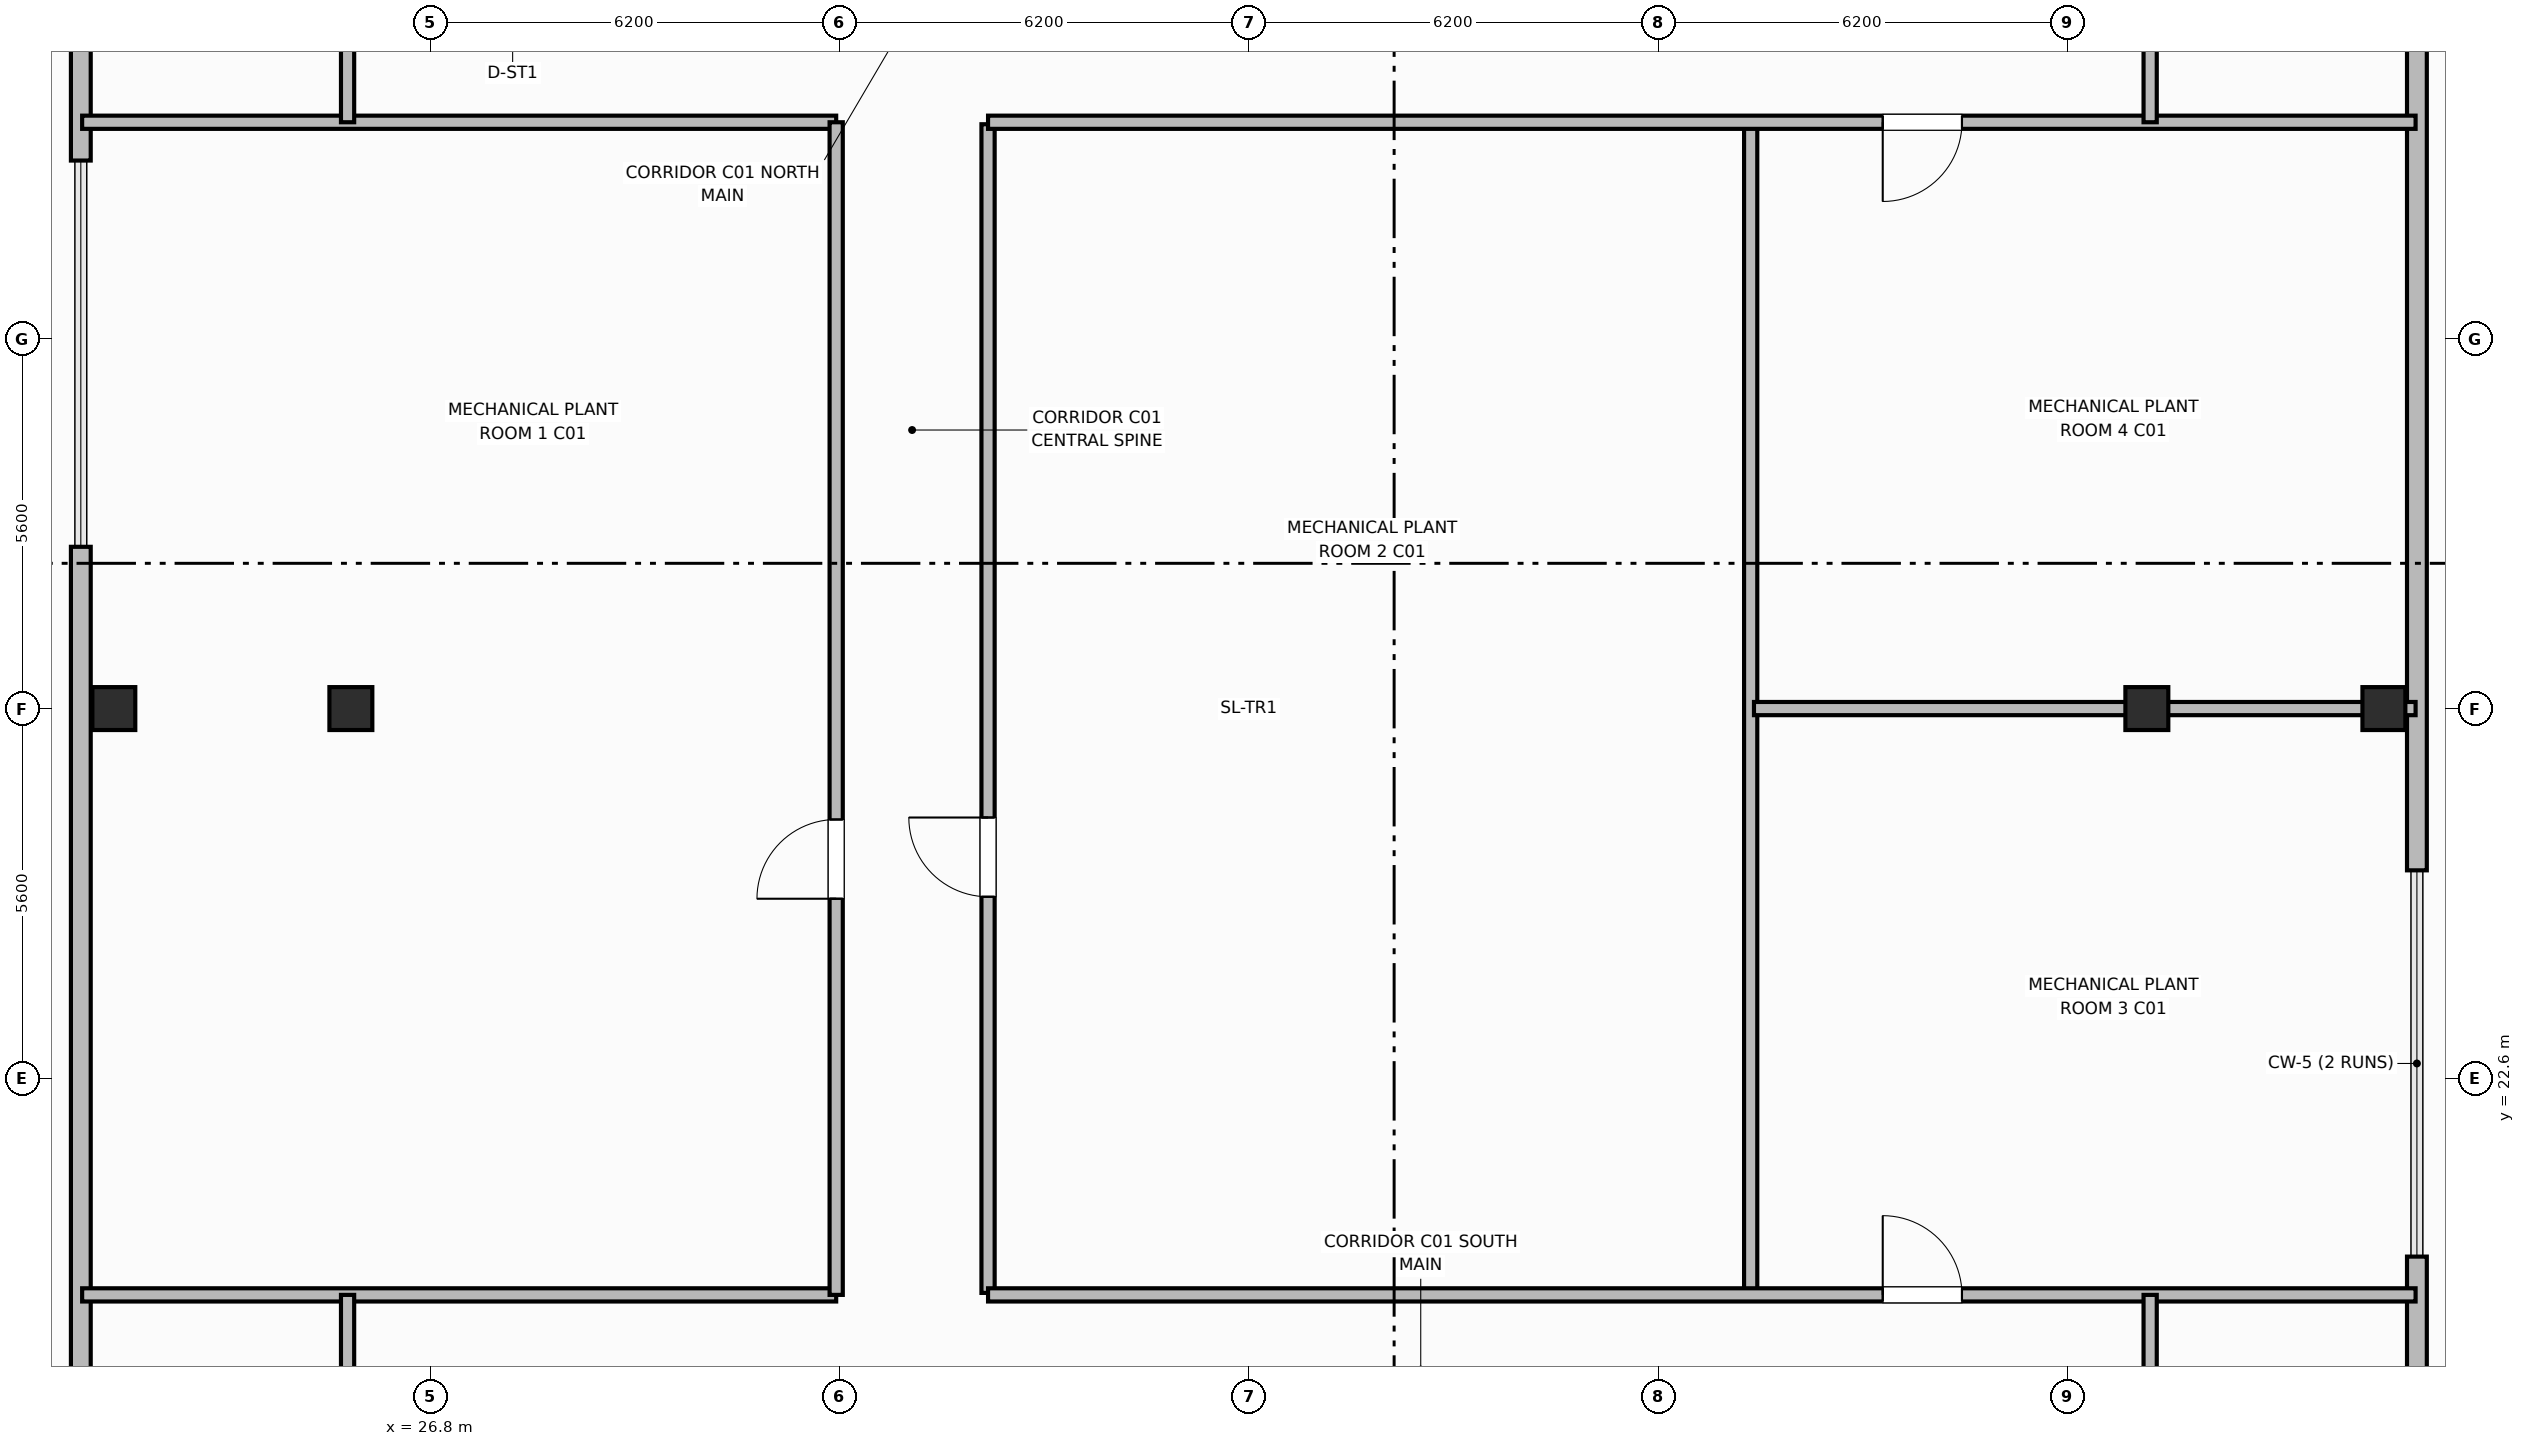
"""IFC4 building model, lengths in metres.
Left out: names, types, materials, properties, quantities, classifications, styles, units other than length and angle.
Written with IfcOpenShell. Run it as: python <this file> out.ifc"""

import sys

from ifc_helpers import new_model, si_unit, direction, frame, frame_2d, origin, origin_2d, place, context, subcontext, project, spatial, rectangle, extrude, element, fill, save


model = new_model("IFC4")
c1 = context("Model", 3, precision=1e-05, world=origin(), true_north=direction((0.0, 1.0)))
c2 = subcontext(c1, "Body", "Model", "MODEL_VIEW")
j1 = project(units=[si_unit("LENGTHUNIT", "METRE"), si_unit("PLANEANGLEUNIT", "RADIAN")], contexts=[c1])
p1 = place(None, origin())
s1 = spatial("IfcSite", under=j1, at=p1, CompositionType="ELEMENT")
p2 = place(p1, origin())
s2 = spatial("IfcBuilding", under=s1, at=p2, CompositionType="ELEMENT")
p3 = place(p2, frame((0.0, 0.0, 302.0)))
s3 = spatial("IfcBuildingStorey", under=s2, at=p3, CompositionType="ELEMENT", Elevation=302.0)
for number, where, z_axis, x_axis in (
    (1, (25.6, 28.2, 0.0), (0.0, 0.0, 1.0), (1.0, 0.0, 0.0)),
    (2, (52.8, 28.2, 0.0), (0.0, 0.0, 1.0), (1.0, 0.0, 0.0)),
    (3, (22.01, 28.2, 0.0), (0.0, 0.0, 1.0), (1.0, 0.0, 0.0)),
    (4, (56.39, 28.2, 0.0), (0.0, 0.0, 1.0), (1.0, 0.0, 0.0)),
):
    element("IfcColumn", number, at=place(p3, frame(where, z_axis=z_axis, x_axis=x_axis)), inside=s3, PredefinedType="COLUMN", context=c2, shape_type="SweptSolid", body=[
        extrude(rectangle(XDim=0.65, YDim=0.65, at=origin_2d()), origin(), (0.0, 0.0, 1.0), 3.6),
    ])
p4 = place(p3, frame((56.89, 12.25, 0.0), z_axis=(0.0, 0.0, 1.0), x_axis=(0.0, 1.0, 0.0)))
e5 = element("IfcWall", 5, at=p4, inside=s3, PredefinedType="SOLIDWALL", context=c2, shape_type="SweptSolid", body=[
    extrude(rectangle(XDim=7.65, YDim=0.3, at=frame_2d((3.825, 0.0))), origin(), (0.0, 0.0, 1.0), 2.84),
])
p5 = place(p3, frame((56.89, 25.75, 0.0), z_axis=(0.0, 0.0, 1.0), x_axis=(0.0, 1.0, 0.0)))
e6 = element("IfcWall", 6, at=p5, inside=s3, PredefinedType="SOLIDWALL", context=c2, shape_type="SweptSolid", body=[
    extrude(rectangle(XDim=18.4, YDim=0.3, at=frame_2d((9.2, 0.0))), origin(), (0.0, 0.0, 1.0), 2.84),
])
p6 = place(p3, frame((21.51, 44.15, 0.0), z_axis=(0.0, 0.0, 1.0), x_axis=(0.0, -1.0, 0.0)))
e7 = element("IfcWall", 7, at=p6, inside=s3, PredefinedType="SOLIDWALL", context=c2, shape_type="SweptSolid", body=[
    extrude(rectangle(XDim=7.65, YDim=0.3, at=frame_2d((3.825, 0.0))), origin(), (0.0, 0.0, 1.0), 2.84),
])
p7 = place(p3, frame((21.51, 30.65, 0.0), z_axis=(0.0, 0.0, 1.0), x_axis=(0.0, -1.0, 0.0)))
e8 = element("IfcWall", 8, at=p7, inside=s3, PredefinedType="SOLIDWALL", context=c2, shape_type="SweptSolid", body=[
    extrude(rectangle(XDim=18.4, YDim=0.3, at=frame_2d((9.2, 0.0))), origin(), (0.0, 0.0, 1.0), 2.84),
])
for number, where, z_axis, x_axis in (
    (9, (21.53, 19.32, 0.0), (0.0, 0.0, 1.0), (1.0, 0.0, 0.0)),
    (10, (21.53, 37.08, 0.0), (0.0, 0.0, 1.0), (1.0, 0.0, 0.0)),
):
    element("IfcWall", number, at=place(p3, frame(where, z_axis=z_axis, x_axis=x_axis)), inside=s3, PredefinedType="PARTITIONING", context=c2, shape_type="SweptSolid", body=[
        extrude(rectangle(XDim=11.42, YDim=0.2, at=frame_2d((5.71, 0.0))), origin(), (0.0, 0.0, 1.0), 2.54),
    ])
p8 = place(p3, frame((32.95, 19.32, 0.0), z_axis=(0.0, 0.0, 1.0), x_axis=(0.0, 1.0, 0.0)))
e11 = element("IfcWall", 11, at=p8, inside=s3, PredefinedType="PARTITIONING", context=c2, shape_type="SweptSolid", body=[
    extrude(rectangle(XDim=17.76, YDim=0.2, at=frame_2d((8.88, 0.0))), origin(), (0.0, 0.0, 1.0), 2.54),
])
p9 = place(p8, frame((6.0, 0.0, 0.0)))
e12 = element("IfcOpeningElement", 12, at=p9, cuts=e11, PredefinedType="OPENING", context=c2, shape_type="SweptSolid", body=[
    extrude(rectangle(XDim=1.2, YDim=2.15, at=frame_2d((0.6, 1.075))), frame((0.0, 0.11, 0.0), z_axis=(0.0, -1.0, 0.0), x_axis=(1.0, 0.0, 0.0)), (0.0, 0.0, 1.0), 0.22),
])
p10 = place(p3, frame((35.25, 19.35, 0.0), z_axis=(0.0, 0.0, 1.0), x_axis=(0.0, 1.0, 0.0)))
e13 = element("IfcWall", 13, at=p10, inside=s3, PredefinedType="PARTITIONING", context=c2, shape_type="SweptSolid", body=[
    extrude(rectangle(XDim=17.7, YDim=0.2, at=frame_2d((8.85, 0.0))), origin(), (0.0, 0.0, 1.0), 2.54),
])
p11 = place(p10, frame((6.0, 0.0, 0.0)))
e14 = element("IfcOpeningElement", 14, at=p11, cuts=e13, PredefinedType="OPENING", context=c2, shape_type="SweptSolid", body=[
    extrude(rectangle(XDim=1.2, YDim=2.15, at=frame_2d((0.6, 1.075))), frame((0.0, 0.11, 0.0), z_axis=(0.0, -1.0, 0.0), x_axis=(1.0, 0.0, 0.0)), (0.0, 0.0, 1.0), 0.22),
])
p12 = place(p3, frame((46.8, 19.35, 0.0), z_axis=(0.0, 0.0, 1.0), x_axis=(0.0, 1.0, 0.0)))
e15 = element("IfcWall", 15, at=p12, inside=s3, PredefinedType="PARTITIONING", context=c2, shape_type="SweptSolid", body=[
    extrude(rectangle(XDim=17.7, YDim=0.2, at=frame_2d((8.85, 0.0))), origin(), (0.0, 0.0, 1.0), 2.54),
])
p13 = place(p3, frame((46.85, 28.2, 0.0), z_axis=(0.0, 0.0, 1.0), x_axis=(1.0, 0.0, 0.0)))
e16 = element("IfcWall", 16, at=p13, inside=s3, PredefinedType="PARTITIONING", context=c2, shape_type="SweptSolid", body=[
    extrude(rectangle(XDim=10.02, YDim=0.2, at=frame_2d((5.01, 0.0))), origin(), (0.0, 0.0, 1.0), 2.54),
])
p14 = place(p3, frame((35.25, 19.32, 0.0), z_axis=(0.0, 0.0, 1.0), x_axis=(1.0, 0.0, 0.0)))
e17 = element("IfcWall", 17, at=p14, inside=s3, PredefinedType="PARTITIONING", context=c2, shape_type="SweptSolid", body=[
    extrude(rectangle(XDim=21.62, YDim=0.2, at=frame_2d((10.81, 0.0))), origin(), (0.0, 0.0, 1.0), 2.54),
])
p15 = place(p14, frame((13.55, 0.0, 0.0)))
e18 = element("IfcOpeningElement", 18, at=p15, cuts=e17, PredefinedType="OPENING", context=c2, shape_type="SweptSolid", body=[
    extrude(rectangle(XDim=1.2, YDim=2.15, at=frame_2d((0.6, 1.075))), frame((0.0, 0.11, 0.0), z_axis=(0.0, -1.0, 0.0), x_axis=(1.0, 0.0, 0.0)), (0.0, 0.0, 1.0), 0.22),
])
p16 = place(p3, frame((56.87, 37.08, 0.0), z_axis=(0.0, 0.0, 1.0), x_axis=(-1.0, 0.0, 0.0)))
e19 = element("IfcWall", 19, at=p16, inside=s3, PredefinedType="PARTITIONING", context=c2, shape_type="SweptSolid", body=[
    extrude(rectangle(XDim=21.62, YDim=0.2, at=frame_2d((10.81, 0.0))), origin(), (0.0, 0.0, 1.0), 2.54),
])
p17 = place(p16, frame((6.87, 0.0, 0.0)))
e20 = element("IfcOpeningElement", 20, at=p17, cuts=e19, PredefinedType="OPENING", context=c2, shape_type="SweptSolid", body=[
    extrude(rectangle(XDim=1.2, YDim=2.15, at=frame_2d((0.6, 1.075))), frame((0.0, 0.11, 0.0), z_axis=(0.0, -1.0, 0.0), x_axis=(1.0, 0.0, 0.0)), (0.0, 0.0, 1.0), 0.22),
])
p18 = place(p3, frame((52.85, 16.95, 0.0), z_axis=(0.0, 0.0, 1.0), x_axis=(0.0, 1.0, 0.0)))
e21 = element("IfcWall", 21, at=p18, inside=s3, PredefinedType="PARTITIONING", context=c2, shape_type="SweptSolid", body=[
    extrude(rectangle(XDim=2.37, YDim=0.2, at=frame_2d((1.185, 0.0))), origin(), (0.0, 0.0, 1.0), 2.54),
])
p19 = place(p3, frame((52.85, 37.08, 0.0), z_axis=(0.0, 0.0, 1.0), x_axis=(0.0, 1.0, 0.0)))
e22 = element("IfcWall", 22, at=p19, inside=s3, PredefinedType="PARTITIONING", context=c2, shape_type="SweptSolid", body=[
    extrude(rectangle(XDim=2.37, YDim=0.2, at=frame_2d((1.185, 0.0))), origin(), (0.0, 0.0, 1.0), 2.54),
])
p20 = place(p3, frame((25.55, 16.95, 0.0), z_axis=(0.0, 0.0, 1.0), x_axis=(0.0, 1.0, 0.0)))
e23 = element("IfcWall", 23, at=p20, inside=s3, PredefinedType="PARTITIONING", context=c2, shape_type="SweptSolid", body=[
    extrude(rectangle(XDim=2.37, YDim=0.2, at=frame_2d((1.185, 0.0))), origin(), (0.0, 0.0, 1.0), 2.54),
])
p21 = place(p3, frame((25.55, 37.08, 0.0), z_axis=(0.0, 0.0, 1.0), x_axis=(0.0, 1.0, 0.0)))
e24 = element("IfcWall", 24, at=p21, inside=s3, PredefinedType="PARTITIONING", context=c2, shape_type="SweptSolid", body=[
    extrude(rectangle(XDim=2.37, YDim=0.2, at=frame_2d((1.185, 0.0))), origin(), (0.0, 0.0, 1.0), 2.54),
])
p22 = place(p9, origin())
e25 = element("IfcDoor", 25, at=p22, inside=s3, OperationType="SINGLE_SWING_LEFT", PredefinedType="DOOR", context=c2, shape_type="SweptSolid", body=[
    extrude(rectangle(XDim=1.2, YDim=2.15, at=frame_2d((0.6, 1.075))), frame((0.0, 0.025, 0.0), z_axis=(0.0, -1.0, 0.0), x_axis=(1.0, 0.0, 0.0)), (0.0, 0.0, 1.0), 0.05),
])
fill(e12, e25)
p23 = place(p11, origin())
e26 = element("IfcDoor", 26, at=p23, inside=s3, OperationType="SINGLE_SWING_RIGHT", PredefinedType="DOOR", context=c2, shape_type="SweptSolid", body=[
    extrude(rectangle(XDim=1.2, YDim=2.15, at=frame_2d((0.6, 1.075))), frame((0.0, 0.025, 0.0), z_axis=(0.0, -1.0, 0.0), x_axis=(1.0, 0.0, 0.0)), (0.0, 0.0, 1.0), 0.05),
])
fill(e14, e26)
p24 = place(p15, origin())
e27 = element("IfcDoor", 27, at=p24, inside=s3, OperationType="SINGLE_SWING_LEFT", PredefinedType="DOOR", context=c2, shape_type="SweptSolid", body=[
    extrude(rectangle(XDim=1.2, YDim=2.15, at=frame_2d((0.6, 1.075))), frame((0.0, 0.025, 0.0), z_axis=(0.0, -1.0, 0.0), x_axis=(1.0, 0.0, 0.0)), (0.0, 0.0, 1.0), 0.05),
])
fill(e18, e27)
p25 = place(p17, origin())
e28 = element("IfcDoor", 28, at=p25, inside=s3, OperationType="SINGLE_SWING_RIGHT", PredefinedType="DOOR", context=c2, shape_type="SweptSolid", body=[
    extrude(rectangle(XDim=1.2, YDim=2.15, at=frame_2d((0.6, 1.075))), frame((0.0, 0.025, 0.0), z_axis=(0.0, -1.0, 0.0), x_axis=(1.0, 0.0, 0.0)), (0.0, 0.0, 1.0), 0.05),
])
fill(e20, e28)
save(model, sys.argv[1])
